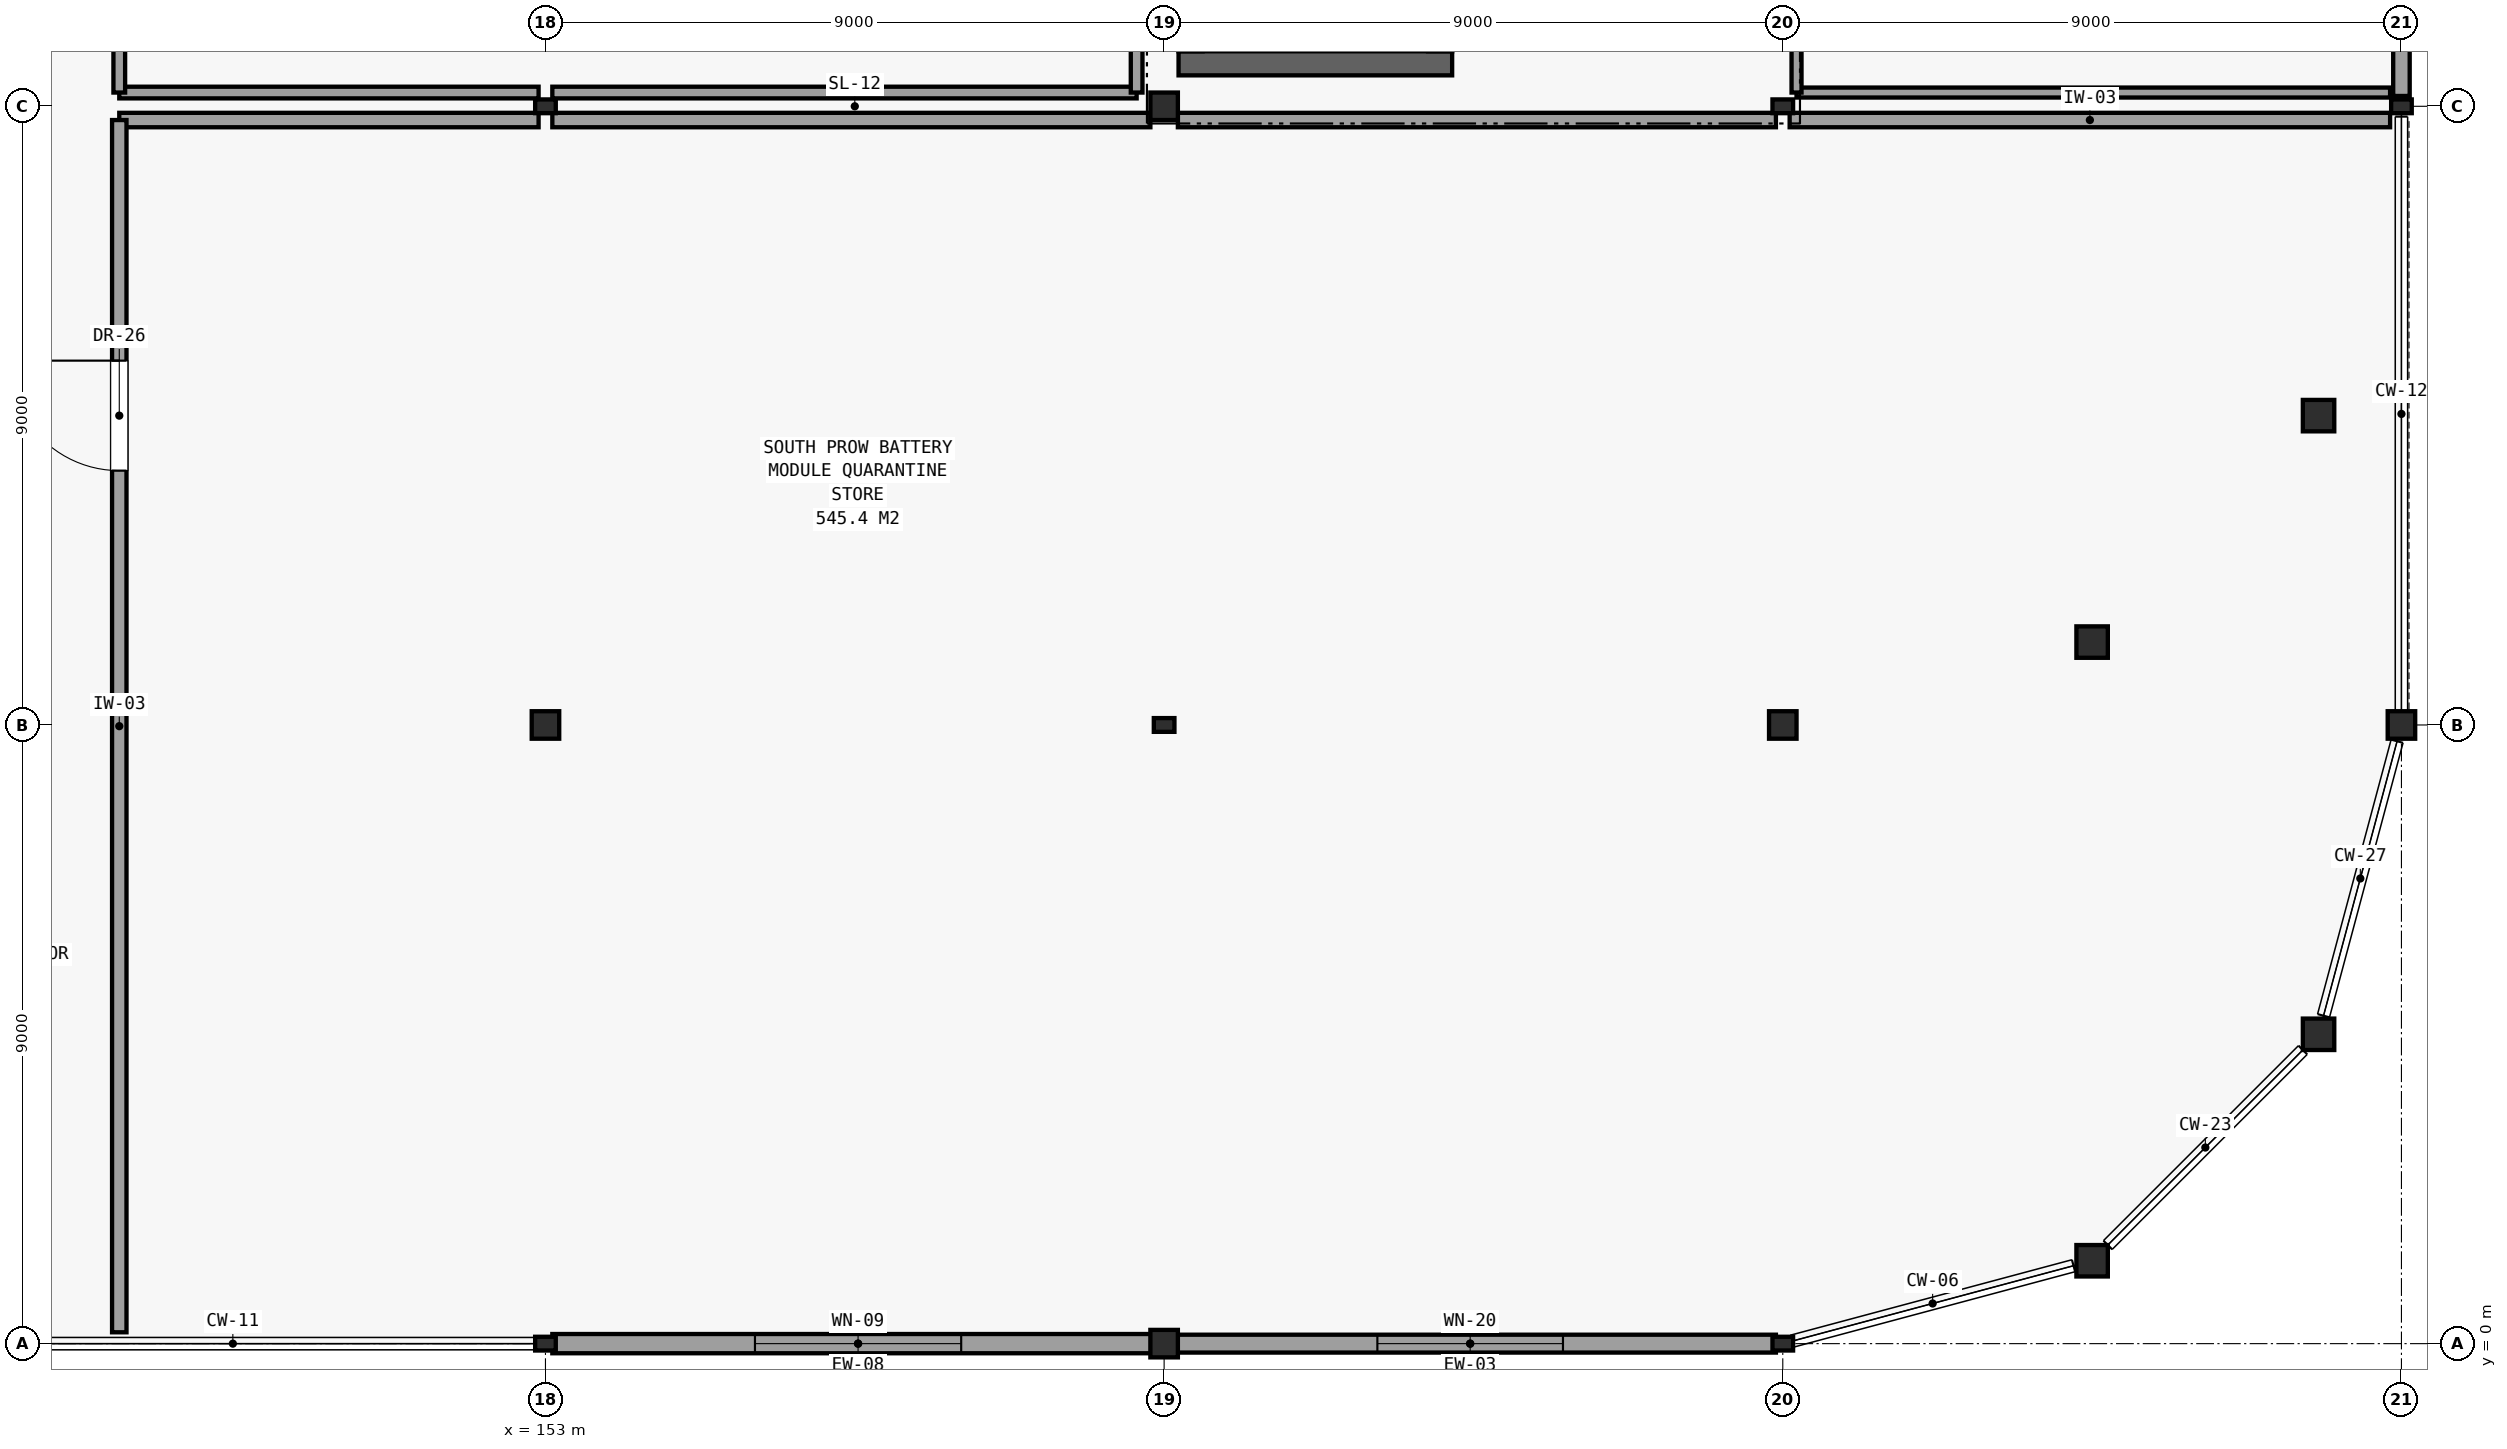
"""IFC4 building model, lengths in metres.
Left out: names, types, materials, properties, quantities, classifications, styles, units other than length and angle.
Written with IfcOpenShell. Run it as: python <this file> out.ifc"""

import sys

from ifc_helpers import new_model, si_unit, direction, frame, frame_2d, origin, origin_2d, place, context, subcontext, project, spatial, rectangle, hollow_rectangle, hollow_circle, i_section, extrude, element, fill, save


model = new_model("IFC4")
c1 = context("Model", 3, precision=1e-05, world=origin(), true_north=direction((0.0, 1.0)))
c2 = subcontext(c1, "Body", "Model", "MODEL_VIEW")
j1 = project(units=[si_unit("LENGTHUNIT", "METRE"), si_unit("PLANEANGLEUNIT", "RADIAN")], contexts=[c1])
p1 = place(None, origin())
s1 = spatial("IfcSite", under=j1, at=p1, CompositionType="ELEMENT")
p2 = place(p1, origin())
s2 = spatial("IfcBuilding", under=s1, at=p2, CompositionType="ELEMENT")
p3 = place(p2, frame((0.0, 0.0, 5.1)))
s3 = spatial("IfcBuildingStorey", under=s2, at=p3, CompositionType="ELEMENT", Elevation=5.1)
p4 = place(p3, frame((153.0, 0.0, 0.0), z_axis=(0.0, 0.0, 1.0), x_axis=(1.0, 0.0, 0.0)))
e1 = element("IfcColumn", 1, at=p4, inside=s3, PredefinedType="COLUMN", context=c2, shape_type="SweptSolid", body=[
    extrude(hollow_rectangle(XDim=0.2, YDim=0.3, WallThickness=0.012, at=origin_2d()), origin(), (0.0, 0.0, 1.0), 4.14),
])
p5 = place(p3, frame((153.0, 9.0, 0.0), z_axis=(0.0, 0.0, 1.0), x_axis=(1.0, 0.0, 0.0)))
e2 = element("IfcColumn", 2, at=p5, inside=s3, PredefinedType="COLUMN", context=c2, shape_type="SweptSolid", body=[
    extrude(i_section(OverallWidth=0.4, OverallDepth=0.4, WebThickness=0.013, FlangeThickness=0.021, FilletRadius=0.016, at=origin_2d()), origin(), (0.0, 0.0, 1.0), 4.2),
])
p6 = place(p3, frame((153.0, 18.0, 0.0), z_axis=(0.0, 0.0, 1.0), x_axis=(1.0, 0.0, 0.0)))
e3 = element("IfcColumn", 3, at=p6, inside=s3, PredefinedType="COLUMN", context=c2, shape_type="SweptSolid", body=[
    extrude(hollow_rectangle(XDim=0.2, YDim=0.3, WallThickness=0.012, at=origin_2d()), origin(), (0.0, 0.0, 1.0), 4.2),
])
p7 = place(p3, frame((162.0, 0.0, 0.0), z_axis=(0.0, 0.0, 1.0), x_axis=(1.0, 0.0, 0.0)))
e4 = element("IfcColumn", 4, at=p7, inside=s3, PredefinedType="COLUMN", context=c2, shape_type="SweptSolid", body=[
    extrude(i_section(OverallWidth=0.4, OverallDepth=0.4, WebThickness=0.013, FlangeThickness=0.021, FilletRadius=0.016, at=origin_2d()), origin(), (0.0, 0.0, 1.0), 4.14),
])
p8 = place(p3, frame((162.0, 9.0, 0.0), z_axis=(0.0, 0.0, 1.0), x_axis=(1.0, 0.0, 0.0)))
e5 = element("IfcColumn", 5, at=p8, inside=s3, PredefinedType="COLUMN", context=c2, shape_type="SweptSolid", body=[
    extrude(hollow_rectangle(XDim=0.2, YDim=0.3, WallThickness=0.012, at=origin_2d()), origin(), (0.0, 0.0, 1.0), 4.2),
])
p9 = place(p3, frame((162.0, 18.0, 0.0), z_axis=(0.0, 0.0, 1.0), x_axis=(1.0, 0.0, 0.0)))
e6 = element("IfcColumn", 6, at=p9, inside=s3, PredefinedType="COLUMN", context=c2, shape_type="SweptSolid", body=[
    extrude(i_section(OverallWidth=0.4, OverallDepth=0.4, WebThickness=0.013, FlangeThickness=0.021, FilletRadius=0.016, at=origin_2d()), origin(), (0.0, 0.0, 1.0), 4.2),
])
p10 = place(p3, frame((171.0, 0.0, 0.0), z_axis=(0.0, 0.0, 1.0), x_axis=(1.0, 0.0, 0.0)))
e7 = element("IfcColumn", 7, at=p10, inside=s3, PredefinedType="COLUMN", context=c2, shape_type="SweptSolid", body=[
    extrude(hollow_rectangle(XDim=0.2, YDim=0.3, WallThickness=0.012, at=origin_2d()), origin(), (0.0, 0.0, 1.0), 4.14),
])
p11 = place(p3, frame((171.0, 9.0, 0.0), z_axis=(0.0, 0.0, 1.0), x_axis=(1.0, 0.0, 0.0)))
e8 = element("IfcColumn", 8, at=p11, inside=s3, PredefinedType="COLUMN", context=c2, shape_type="SweptSolid", body=[
    extrude(i_section(OverallWidth=0.4, OverallDepth=0.4, WebThickness=0.013, FlangeThickness=0.021, FilletRadius=0.016, at=origin_2d()), origin(), (0.0, 0.0, 1.0), 4.2),
])
p12 = place(p3, frame((171.0, 18.0, 0.0), z_axis=(0.0, 0.0, 1.0), x_axis=(1.0, 0.0, 0.0)))
e9 = element("IfcColumn", 9, at=p12, inside=s3, PredefinedType="COLUMN", context=c2, shape_type="SweptSolid", body=[
    extrude(hollow_rectangle(XDim=0.2, YDim=0.3, WallThickness=0.012, at=origin_2d()), origin(), (0.0, 0.0, 1.0), 4.2),
])
p13 = place(p3, frame((175.5, 1.206, 0.0), z_axis=(0.0, 0.0, 1.0), x_axis=(1.0, 0.0, 0.0)))
e10 = element("IfcColumn", 10, at=p13, inside=s3, PredefinedType="COLUMN", context=c2, shape_type="SweptSolid", body=[
    extrude(hollow_circle(Radius=0.229, WallThickness=0.016, at=origin_2d()), origin(), (0.0, 0.0, 1.0), 4.14),
])
p14 = place(p3, frame((175.5, 10.206, 0.0), z_axis=(0.0, 0.0, 1.0), x_axis=(1.0, 0.0, 0.0)))
e11 = element("IfcColumn", 11, at=p14, inside=s3, PredefinedType="COLUMN", context=c2, shape_type="SweptSolid", body=[
    extrude(hollow_circle(Radius=0.229, WallThickness=0.016, at=origin_2d()), origin(), (0.0, 0.0, 1.0), 4.2),
])
p15 = place(p3, frame((178.794, 4.5, 0.0), z_axis=(0.0, 0.0, 1.0), x_axis=(1.0, 0.0, 0.0)))
e12 = element("IfcColumn", 12, at=p15, inside=s3, PredefinedType="COLUMN", context=c2, shape_type="SweptSolid", body=[
    extrude(hollow_circle(Radius=0.229, WallThickness=0.016, at=origin_2d()), origin(), (0.0, 0.0, 1.0), 4.14),
])
p16 = place(p3, frame((178.794, 13.5, 0.0), z_axis=(0.0, 0.0, 1.0), x_axis=(1.0, 0.0, 0.0)))
e13 = element("IfcColumn", 13, at=p16, inside=s3, PredefinedType="COLUMN", context=c2, shape_type="SweptSolid", body=[
    extrude(hollow_circle(Radius=0.229, WallThickness=0.016, at=origin_2d()), origin(), (0.0, 0.0, 1.0), 4.2),
])
p17 = place(p3, frame((180.0, 9.0, 0.0), z_axis=(0.0, 0.0, 1.0), x_axis=(1.0, 0.0, 0.0)))
e14 = element("IfcColumn", 14, at=p17, inside=s3, PredefinedType="COLUMN", context=c2, shape_type="SweptSolid", body=[
    extrude(i_section(OverallWidth=0.4, OverallDepth=0.4, WebThickness=0.013, FlangeThickness=0.021, FilletRadius=0.016, at=origin_2d()), origin(), (0.0, 0.0, 1.0), 4.14),
])
p18 = place(p3, frame((180.0, 18.0, 0.0), z_axis=(0.0, 0.0, 1.0), x_axis=(1.0, 0.0, 0.0)))
e15 = element("IfcColumn", 15, at=p18, inside=s3, PredefinedType="COLUMN", context=c2, shape_type="SweptSolid", body=[
    extrude(hollow_rectangle(XDim=0.2, YDim=0.3, WallThickness=0.012, at=origin_2d()), origin(), (0.0, 0.0, 1.0), 4.2),
])
p19 = place(p3, frame((153.1, 0.0, 0.0), z_axis=(0.0, 0.0, 1.0), x_axis=(1.0, 0.0, 0.0)))
e16 = element("IfcWall", 16, at=p19, inside=s3, PredefinedType="SOLIDWALL", context=c2, shape_type="SweptSolid", body=[
    extrude(rectangle(XDim=8.896, YDim=0.28, at=frame_2d((4.448, 0.0))), origin(), (0.0, 0.0, 1.0), 3.29),
])
p20 = place(p19, frame((2.948, 0.0, 0.95)))
e17 = element("IfcOpeningElement", 17, at=p20, cuts=e16, PredefinedType="OPENING", context=c2, shape_type="SweptSolid", body=[
    extrude(rectangle(XDim=3.0, YDim=1.4, at=frame_2d((1.5, 0.7))), frame((0.0, 0.151, 0.0), z_axis=(0.0, -1.0, 0.0), x_axis=(1.0, 0.0, 0.0)), (0.0, 0.0, 1.0), 0.302),
])
p21 = place(p3, frame((162.004, 0.0, 0.0), z_axis=(0.0, 0.0, 1.0), x_axis=(1.0, 0.0, 0.0)))
e18 = element("IfcWall", 18, at=p21, inside=s3, PredefinedType="SOLIDWALL", context=c2, shape_type="SweptSolid", body=[
    extrude(rectangle(XDim=8.896, YDim=0.26, at=frame_2d((4.448, 0.0))), origin(), (0.0, 0.0, 1.0), 3.29),
])
p22 = place(p21, frame((3.098, 0.0, 0.95)))
e19 = element("IfcOpeningElement", 19, at=p22, cuts=e18, PredefinedType="OPENING", context=c2, shape_type="SweptSolid", body=[
    extrude(rectangle(XDim=2.7, YDim=1.4, at=frame_2d((1.35, 0.7))), frame((0.0, 0.141, 0.0), z_axis=(0.0, -1.0, 0.0), x_axis=(1.0, 0.0, 0.0)), (0.0, 0.0, 1.0), 0.282),
])
p23 = place(p3, frame((180.0, 18.15, 0.0), z_axis=(0.0, 0.0, 1.0), x_axis=(0.0, 1.0, 0.0)))
e20 = element("IfcWall", 20, at=p23, inside=s3, PredefinedType="SOLIDWALL", context=c2, shape_type="SweptSolid", body=[
    extrude(rectangle(XDim=8.65, YDim=0.24, at=frame_2d((4.325, 0.0))), origin(), (0.0, 0.0, 1.0), 3.29),
])
p24 = place(p23, frame((3.125, 0.0, 0.95)))
e21 = element("IfcOpeningElement", 21, at=p24, cuts=e20, PredefinedType="OPENING", context=c2, shape_type="SweptSolid", body=[
    extrude(rectangle(XDim=2.4, YDim=1.3, at=frame_2d((1.2, 0.65))), frame((0.0, 0.131, 0.0), z_axis=(0.0, -1.0, 0.0), x_axis=(1.0, 0.0, 0.0)), (0.0, 0.0, 1.0), 0.262),
])
p25 = place(p3, frame((162.21, 18.625, 0.0), z_axis=(0.0, 0.0, 1.0), x_axis=(1.0, 0.0, 0.0)))
e22 = element("IfcWall", 22, at=p25, inside=s3, PredefinedType="SHEAR", context=c2, shape_type="SweptSolid", body=[
    extrude(rectangle(XDim=3.98, YDim=0.35, at=frame_2d((1.99, 0.0))), origin(), (0.0, 0.0, 1.0), 3.95),
])
p26 = place(p3, frame((146.8, 18.2, 0.0), z_axis=(0.0, 0.0, 1.0), x_axis=(1.0, 0.0, 0.0)))
e23 = element("IfcWall", 23, at=p26, inside=s3, PredefinedType="PARTITIONING", context=c2, shape_type="SweptSolid", body=[
    extrude(rectangle(XDim=6.1, YDim=0.17, at=frame_2d((3.05, 0.0))), origin(), (0.0, 0.0, 1.0), 3.3),
])
p27 = place(p3, frame((153.1, 18.2, 0.0), z_axis=(0.0, 0.0, 1.0), x_axis=(1.0, 0.0, 0.0)))
e24 = element("IfcWall", 24, at=p27, inside=s3, PredefinedType="PARTITIONING", context=c2, shape_type="SweptSolid", body=[
    extrude(rectangle(XDim=8.5, YDim=0.17, at=frame_2d((4.25, 0.0))), origin(), (0.0, 0.0, 1.0), 3.3),
])
p28 = place(p3, frame((146.8, 18.2, 0.0), z_axis=(0.0, 0.0, 1.0), x_axis=(0.0, 1.0, 0.0)))
e25 = element("IfcWall", 25, at=p28, inside=s3, PredefinedType="PARTITIONING", context=c2, shape_type="SweptSolid", body=[
    extrude(rectangle(XDim=14.4, YDim=0.17, at=frame_2d((7.2, 0.0))), origin(), (0.0, 0.0, 1.0), 3.35),
])
p29 = place(p28, frame((9.12, 0.0, 0.0)))
e26 = element("IfcOpeningElement", 26, at=p29, cuts=e25, PredefinedType="OPENING", context=c2, shape_type="SweptSolid", body=[
    extrude(rectangle(XDim=2.36, YDim=2.879, at=frame_2d((1.18, 1.439))), frame((0.0, 0.096, 0.0), z_axis=(0.0, -1.0, 0.0), x_axis=(1.0, 0.0, 0.0)), (0.0, 0.0, 1.0), 0.192),
])
p30 = place(p3, frame((161.6, 18.2, 0.0), z_axis=(0.0, 0.0, 1.0), x_axis=(0.0, 1.0, 0.0)))
e27 = element("IfcWall", 27, at=p30, inside=s3, PredefinedType="PARTITIONING", context=c2, shape_type="SweptSolid", body=[
    extrude(rectangle(XDim=14.4, YDim=0.17, at=frame_2d((7.2, 0.0))), origin(), (0.0, 0.0, 1.0), 3.35),
])
p31 = place(p3, frame((171.2, 18.2, 0.0), z_axis=(0.0, 0.0, 1.0), x_axis=(1.0, 0.0, 0.0)))
e28 = element("IfcWall", 28, at=p31, inside=s3, PredefinedType="PARTITIONING", context=c2, shape_type="SweptSolid", body=[
    extrude(rectangle(XDim=8.635, YDim=0.145, at=frame_2d((4.317, 0.0))), origin(), (0.0, 0.0, 1.0), 3.29),
])
p32 = place(p3, frame((171.2, 18.2, 0.0), z_axis=(0.0, 0.0, 1.0), x_axis=(0.0, 1.0, 0.0)))
e29 = element("IfcWall", 29, at=p32, inside=s3, PredefinedType="PARTITIONING", context=c2, shape_type="SweptSolid", body=[
    extrude(rectangle(XDim=8.6, YDim=0.145, at=frame_2d((4.3, 0.0))), origin(), (0.0, 0.0, 1.0), 3.3),
])
p33 = place(p3, frame((146.8, 17.8, 0.0), z_axis=(0.0, 0.0, 1.0), x_axis=(1.0, 0.0, 0.0)))
e30 = element("IfcWall", 30, at=p33, inside=s3, PredefinedType="PARTITIONING", context=c2, shape_type="SweptSolid", body=[
    extrude(rectangle(XDim=6.1, YDim=0.21, at=frame_2d((3.05, 0.0))), origin(), (0.0, 0.0, 1.0), 3.29),
])
for number, where, z_axis, x_axis in (
    (31, (153.1, 17.8, 0.0), (0.0, 0.0, 1.0), (1.0, 0.0, 0.0)),
    (32, (162.2, 17.8, 0.0), (0.0, 0.0, 1.0), (1.0, 0.0, 0.0)),
):
    element("IfcWall", number, at=place(p3, frame(where, z_axis=z_axis, x_axis=x_axis)), inside=s3, PredefinedType="PARTITIONING", context=c2, shape_type="SweptSolid", body=[
        extrude(rectangle(XDim=8.7, YDim=0.21, at=frame_2d((4.35, 0.0))), origin(), (0.0, 0.0, 1.0), 3.29),
    ])
p34 = place(p3, frame((171.1, 17.8, 0.0), z_axis=(0.0, 0.0, 1.0), x_axis=(1.0, 0.0, 0.0)))
e33 = element("IfcWall", 33, at=p34, inside=s3, PredefinedType="PARTITIONING", context=c2, shape_type="SweptSolid", body=[
    extrude(rectangle(XDim=8.735, YDim=0.21, at=frame_2d((4.367, 0.0))), origin(), (0.0, 0.0, 1.0), 3.29),
])
p35 = place(p3, frame((146.8, 0.165, 0.0), z_axis=(0.0, 0.0, 1.0), x_axis=(0.0, 1.0, 0.0)))
e34 = element("IfcWall", 34, at=p35, inside=s3, PredefinedType="PARTITIONING", context=c2, shape_type="SweptSolid", body=[
    extrude(rectangle(XDim=17.635, YDim=0.21, at=frame_2d((8.817, 0.0))), origin(), (0.0, 0.0, 1.0), 3.34),
])
p36 = place(p35, frame((12.535, 0.0, 0.0)))
e35 = element("IfcOpeningElement", 35, at=p36, cuts=e34, PredefinedType="OPENING", context=c2, shape_type="SweptSolid", body=[
    extrude(rectangle(XDim=1.6, YDim=2.3, at=frame_2d((0.8, 1.15))), frame((0.0, 0.116, 0.0), z_axis=(0.0, -1.0, 0.0), x_axis=(1.0, 0.0, 0.0)), (0.0, 0.0, 1.0), 0.232),
])
p37 = place(p20, origin())
e36 = element("IfcWindow", 36, at=p37, inside=s3, PartitioningType="SINGLE_PANEL", PredefinedType="WINDOW", context=c2, shape_type="SweptSolid", body=[
    extrude(rectangle(XDim=3.0, YDim=1.4, at=frame_2d((1.5, 0.7))), frame((0.0, 0.03, 0.0), z_axis=(0.0, -1.0, 0.0), x_axis=(1.0, 0.0, 0.0)), (0.0, 0.0, 1.0), 0.06),
])
fill(e17, e36)
p38 = place(p22, origin())
e37 = element("IfcWindow", 37, at=p38, inside=s3, PartitioningType="SINGLE_PANEL", PredefinedType="WINDOW", context=c2, shape_type="SweptSolid", body=[
    extrude(rectangle(XDim=2.7, YDim=1.4, at=frame_2d((1.35, 0.7))), frame((0.0, 0.03, 0.0), z_axis=(0.0, -1.0, 0.0), x_axis=(1.0, 0.0, 0.0)), (0.0, 0.0, 1.0), 0.06),
])
fill(e19, e37)
p39 = place(p36, origin())
e38 = element("IfcDoor", 38, at=p39, inside=s3, OperationType="SINGLE_SWING_RIGHT", PredefinedType="DOOR", context=c2, shape_type="SweptSolid", body=[
    extrude(rectangle(XDim=1.6, YDim=2.3, at=frame_2d((0.8, 1.15))), frame((0.0, 0.025, 0.0), z_axis=(0.0, -1.0, 0.0), x_axis=(1.0, 0.0, 0.0)), (0.0, 0.0, 1.0), 0.05),
])
fill(e35, e38)
save(model, sys.argv[1])
